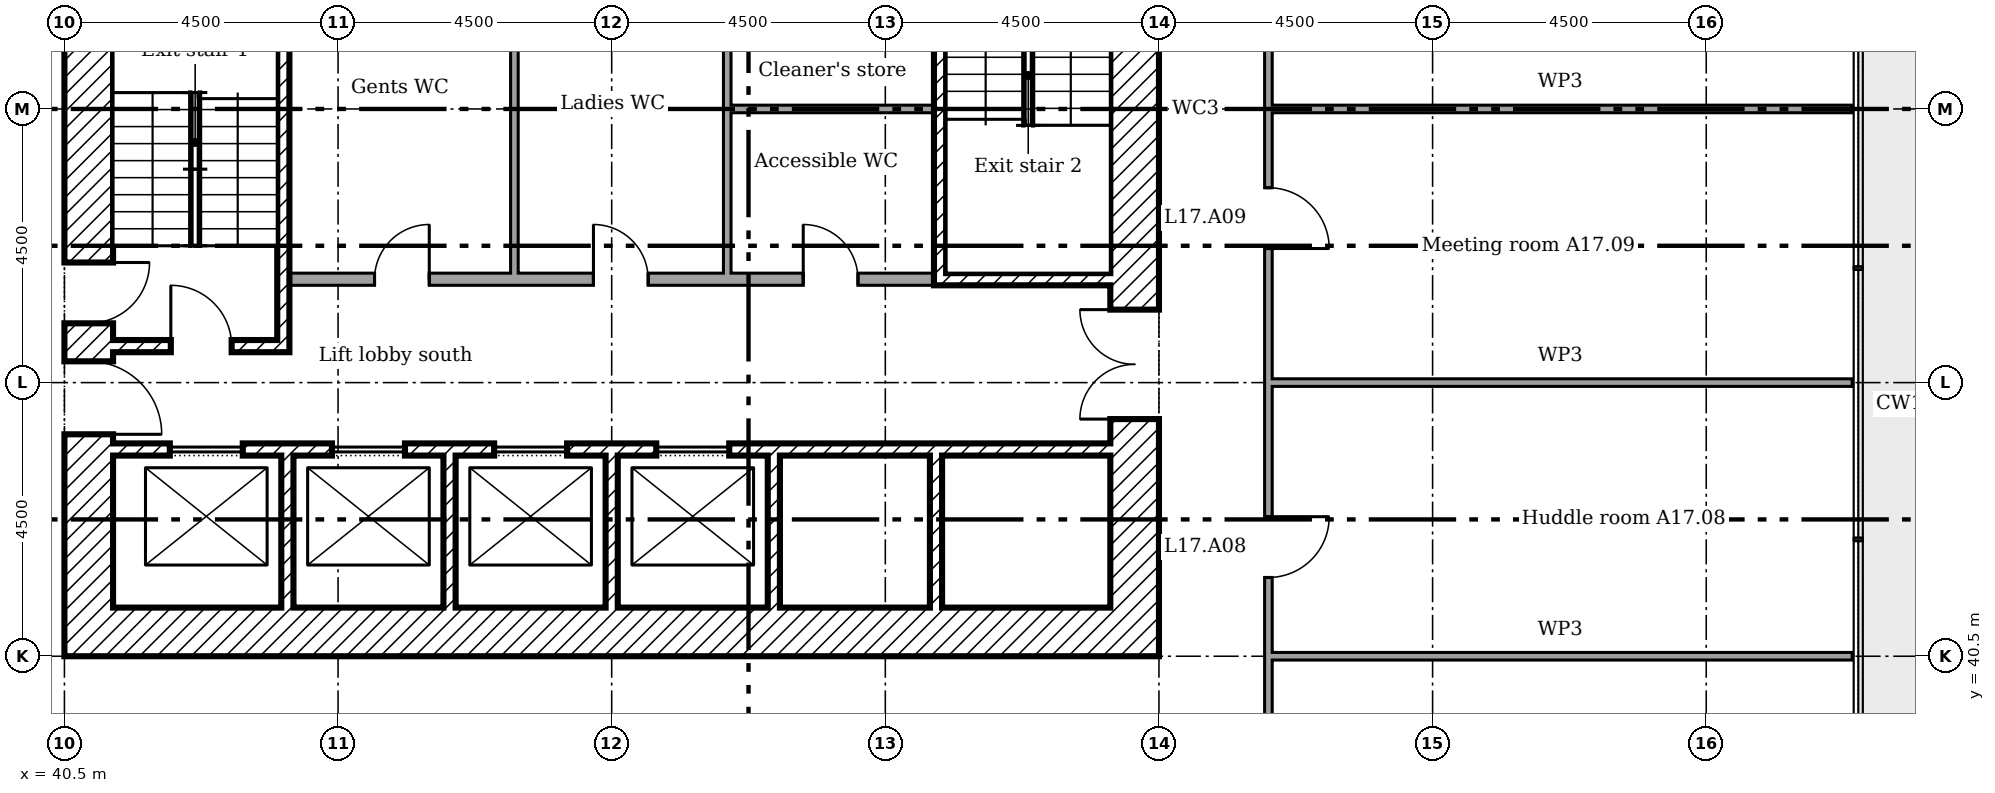
"""IFC4 building model, lengths in metres.
Left out: names, types, materials, properties, quantities, classifications, styles, units other than length and angle.
Written with IfcOpenShell. Run it as: python <this file> out.ifc"""

import sys

from ifc_helpers import new_model, si_unit, direction, frame, frame_2d, origin, place, context, subcontext, project, spatial, rectangle, extrude, element, fill, save


model = new_model("IFC4")
c1 = context("Model", 3, precision=1e-05, world=origin(), true_north=direction((0.0, 1.0)))
c2 = subcontext(c1, "Body", "Model", "MODEL_VIEW")
j1 = project(units=[si_unit("LENGTHUNIT", "METRE"), si_unit("PLANEANGLEUNIT", "RADIAN")], contexts=[c1])
p1 = place(None, origin())
s1 = spatial("IfcSite", under=j1, at=p1, CompositionType="ELEMENT")
p2 = place(p1, origin())
s2 = spatial("IfcBuilding", under=s1, at=p2, CompositionType="ELEMENT")
p3 = place(p2, frame((0.0, 0.0, 72.6)))
s3 = spatial("IfcBuildingStorey", under=s2, at=p3, CompositionType="ELEMENT", Elevation=72.6)
p4 = place(p3, frame((58.1, 40.5, 0.0), z_axis=(0.0, 0.0, 1.0), x_axis=(0.0, 1.0, 0.0)))
e1 = element("IfcWall", 1, at=p4, inside=s3, PredefinedType="SHEAR", context=c2, shape_type="SweptSolid", body=[
    extrude(rectangle(XDim=18.0, YDim=0.8, at=frame_2d((9.0, 0.0))), origin(), (0.0, 0.0, 1.0), 3.35),
])
p5 = place(p4, frame((13.15, 0.0, 0.0)))
e2 = element("IfcOpeningElement", 2, at=p5, cuts=e1, PredefinedType="OPENING", context=c2, shape_type="SweptSolid", body=[
    extrude(rectangle(XDim=1.2, YDim=2.1, at=frame_2d((0.6, 1.05))), frame((0.0, 0.41, 0.0), z_axis=(0.0, -1.0, 0.0), x_axis=(1.0, 0.0, 0.0)), (0.0, 0.0, 1.0), 0.82),
])
p6 = place(p4, frame((3.9, 0.0, 0.0)))
e3 = element("IfcOpeningElement", 3, at=p6, cuts=e1, PredefinedType="OPENING", context=c2, shape_type="SweptSolid", body=[
    extrude(rectangle(XDim=1.8, YDim=2.1, at=frame_2d((0.9, 1.05))), frame((0.0, 0.41, 0.0), z_axis=(0.0, -1.0, 0.0), x_axis=(1.0, 0.0, 0.0)), (0.0, 0.0, 1.0), 0.82),
])
p7 = place(p4, frame((11.525, 0.0, 0.0)))
e4 = element("IfcOpeningElement", 4, at=p7, cuts=e1, PredefinedType="OPENING", context=c2, shape_type="SweptSolid", body=[
    extrude(rectangle(XDim=1.0, YDim=2.1, at=frame_2d((0.5, 1.05))), frame((0.0, 0.41, 0.0), z_axis=(0.0, -1.0, 0.0), x_axis=(1.0, 0.0, 0.0)), (0.0, 0.0, 1.0), 0.82),
])
p8 = place(p3, frame((41.3, 40.9, 0.0)))
e5 = element("IfcWall", 5, at=p8, inside=s3, PredefinedType="SHEAR", context=c2, shape_type="SweptSolid", body=[
    extrude(rectangle(XDim=16.4, YDim=0.8, at=frame_2d((8.2, 0.0))), origin(), (0.0, 0.0, 1.0), 3.35),
])
p9 = place(p3, frame((40.9, 40.5, 0.0), z_axis=(0.0, 0.0, 1.0), x_axis=(0.0, 1.0, 0.0)))
e6 = element("IfcWall", 6, at=p9, inside=s3, PredefinedType="SHEAR", context=c2, shape_type="SweptSolid", body=[
    extrude(rectangle(XDim=18.0, YDim=0.8, at=frame_2d((9.0, 0.0))), origin(), (0.0, 0.0, 1.0), 3.35),
])
p10 = place(p9, frame((3.65, 0.0, 0.0)))
e7 = element("IfcOpeningElement", 7, at=p10, cuts=e6, PredefinedType="OPENING", context=c2, shape_type="SweptSolid", body=[
    extrude(rectangle(XDim=1.2, YDim=2.1, at=frame_2d((0.6, 1.05))), frame((0.0, 0.41, 0.0), z_axis=(0.0, -1.0, 0.0), x_axis=(1.0, 0.0, 0.0)), (0.0, 0.0, 1.0), 0.82),
])
p11 = place(p9, frame((5.475, 0.0, 0.0)))
e8 = element("IfcOpeningElement", 8, at=p11, cuts=e6, PredefinedType="OPENING", context=c2, shape_type="SweptSolid", body=[
    extrude(rectangle(XDim=1.0, YDim=2.1, at=frame_2d((0.5, 1.05))), frame((0.0, 0.41, 0.0), z_axis=(0.0, -1.0, 0.0), x_axis=(1.0, 0.0, 0.0)), (0.0, 0.0, 1.0), 0.82),
])
p12 = place(p9, frame((12.3, 0.0, 0.0)))
e9 = element("IfcOpeningElement", 9, at=p12, cuts=e6, PredefinedType="OPENING", context=c2, shape_type="SweptSolid", body=[
    extrude(rectangle(XDim=1.0, YDim=2.1, at=frame_2d((0.5, 1.05))), frame((0.0, 0.41, 0.0), z_axis=(0.0, -1.0, 0.0), x_axis=(1.0, 0.0, 0.0)), (0.0, 0.0, 1.0), 0.82),
])
for number, where, z_axis, x_axis in (
    (10, (44.167, 41.3, 0.0), (0.0, 0.0, 1.0), (0.0, 1.0, 0.0)),
    (11, (46.833, 41.3, 0.0), (0.0, 0.0, 1.0), (0.0, 1.0, 0.0)),
    (12, (49.5, 41.3, 0.0), (0.0, 0.0, 1.0), (0.0, 1.0, 0.0)),
    (13, (52.167, 41.3, 0.0), (0.0, 0.0, 1.0), (0.0, 1.0, 0.0)),
    (14, (54.833, 41.3, 0.0), (0.0, 0.0, 1.0), (0.0, 1.0, 0.0)),
):
    element("IfcWall", number, at=place(p3, frame(where, z_axis=z_axis, x_axis=x_axis)), inside=s3, PredefinedType="SHEAR", context=c2, shape_type="SweptSolid", body=[
        extrude(rectangle(XDim=2.5, YDim=0.2, at=frame_2d((1.25, 0.0))), origin(), (0.0, 0.0, 1.0), 3.35),
    ])
p13 = place(p3, frame((41.3, 43.9, 0.0)))
e15 = element("IfcWall", 15, at=p13, inside=s3, PredefinedType="SHEAR", context=c2, shape_type="SweptSolid", body=[
    extrude(rectangle(XDim=16.4, YDim=0.2, at=frame_2d((8.2, 0.0))), origin(), (0.0, 0.0, 1.0), 3.35),
])
p14 = place(p13, frame((0.933, 0.0, 0.0)))
e16 = element("IfcOpeningElement", 16, at=p14, cuts=e15, PredefinedType="OPENING", context=c2, shape_type="SweptSolid", body=[
    extrude(rectangle(XDim=1.2, YDim=2.1, at=frame_2d((0.6, 1.05))), frame((0.0, 0.11, 0.0), z_axis=(0.0, -1.0, 0.0), x_axis=(1.0, 0.0, 0.0)), (0.0, 0.0, 1.0), 0.22),
])
p15 = place(p13, frame((3.6, 0.0, 0.0)))
e17 = element("IfcOpeningElement", 17, at=p15, cuts=e15, PredefinedType="OPENING", context=c2, shape_type="SweptSolid", body=[
    extrude(rectangle(XDim=1.2, YDim=2.1, at=frame_2d((0.6, 1.05))), frame((0.0, 0.11, 0.0), z_axis=(0.0, -1.0, 0.0), x_axis=(1.0, 0.0, 0.0)), (0.0, 0.0, 1.0), 0.22),
])
p16 = place(p13, frame((6.267, 0.0, 0.0)))
e18 = element("IfcOpeningElement", 18, at=p16, cuts=e15, PredefinedType="OPENING", context=c2, shape_type="SweptSolid", body=[
    extrude(rectangle(XDim=1.2, YDim=2.1, at=frame_2d((0.6, 1.05))), frame((0.0, 0.11, 0.0), z_axis=(0.0, -1.0, 0.0), x_axis=(1.0, 0.0, 0.0)), (0.0, 0.0, 1.0), 0.22),
])
p17 = place(p13, frame((8.933, 0.0, 0.0)))
e19 = element("IfcOpeningElement", 19, at=p17, cuts=e15, PredefinedType="OPENING", context=c2, shape_type="SweptSolid", body=[
    extrude(rectangle(XDim=1.2, YDim=2.1, at=frame_2d((0.6, 1.05))), frame((0.0, 0.11, 0.0), z_axis=(0.0, -1.0, 0.0), x_axis=(1.0, 0.0, 0.0)), (0.0, 0.0, 1.0), 0.22),
])
p18 = place(p3, frame((44.1, 45.5, 0.0), z_axis=(0.0, 0.0, 1.0), x_axis=(0.0, 1.0, 0.0)))
e20 = element("IfcWall", 20, at=p18, inside=s3, PredefinedType="SHEAR", context=c2, shape_type="SweptSolid", body=[
    extrude(rectangle(XDim=6.9, YDim=0.2, at=frame_2d((3.45, 0.0))), origin(), (0.0, 0.0, 1.0), 3.35),
])
p19 = place(p3, frame((41.3, 45.6, 0.0)))
e21 = element("IfcWall", 21, at=p19, inside=s3, PredefinedType="SHEAR", context=c2, shape_type="SweptSolid", body=[
    extrude(rectangle(XDim=2.7, YDim=0.2, at=frame_2d((1.35, 0.0))), origin(), (0.0, 0.0, 1.0), 3.35),
])
p20 = place(p19, frame((0.95, 0.0, 0.0)))
e22 = element("IfcOpeningElement", 22, at=p20, cuts=e21, PredefinedType="OPENING", context=c2, shape_type="SweptSolid", body=[
    extrude(rectangle(XDim=1.0, YDim=2.1, at=frame_2d((0.5, 1.05))), frame((0.0, 0.11, 0.0), z_axis=(0.0, -1.0, 0.0), x_axis=(1.0, 0.0, 0.0)), (0.0, 0.0, 1.0), 0.22),
])
p21 = place(p3, frame((54.8, 46.7, 0.0)))
e23 = element("IfcWall", 23, at=p21, inside=s3, PredefinedType="SHEAR", context=c2, shape_type="SweptSolid", body=[
    extrude(rectangle(XDim=2.9, YDim=0.2, at=frame_2d((1.45, 0.0))), origin(), (0.0, 0.0, 1.0), 3.35),
])
p22 = place(p3, frame((54.9, 46.8, 0.0), z_axis=(0.0, 0.0, 1.0), x_axis=(0.0, 1.0, 0.0)))
e24 = element("IfcWall", 24, at=p22, inside=s3, PredefinedType="SHEAR", context=c2, shape_type="SweptSolid", body=[
    extrude(rectangle(XDim=6.5, YDim=0.2, at=frame_2d((3.25, 0.0))), origin(), (0.0, 0.0, 1.0), 3.35),
])
p23 = place(p3, frame((44.2, 46.7, 0.0)))
e25 = element("IfcWall", 25, at=p23, inside=s3, PredefinedType="PARTITIONING", context=c2, shape_type="SweptSolid", body=[
    extrude(rectangle(XDim=10.6, YDim=0.2, at=frame_2d((5.3, 0.0))), origin(), (0.0, 0.0, 1.0), 3.35),
])
p24 = place(p23, frame((1.4, 0.0, 0.0)))
e26 = element("IfcOpeningElement", 26, at=p24, cuts=e25, PredefinedType="OPENING", context=c2, shape_type="SweptSolid", body=[
    extrude(rectangle(XDim=0.9, YDim=2.1, at=frame_2d((0.45, 1.05))), frame((0.0, 0.11, 0.0), z_axis=(0.0, -1.0, 0.0), x_axis=(1.0, 0.0, 0.0)), (0.0, 0.0, 1.0), 0.22),
])
p25 = place(p23, frame((5.0, 0.0, 0.0)))
e27 = element("IfcOpeningElement", 27, at=p25, cuts=e25, PredefinedType="OPENING", context=c2, shape_type="SweptSolid", body=[
    extrude(rectangle(XDim=0.9, YDim=2.1, at=frame_2d((0.45, 1.05))), frame((0.0, 0.11, 0.0), z_axis=(0.0, -1.0, 0.0), x_axis=(1.0, 0.0, 0.0)), (0.0, 0.0, 1.0), 0.22),
])
p26 = place(p23, frame((8.45, 0.0, 0.0)))
e28 = element("IfcOpeningElement", 28, at=p26, cuts=e25, PredefinedType="OPENING", context=c2, shape_type="SweptSolid", body=[
    extrude(rectangle(XDim=0.9, YDim=2.1, at=frame_2d((0.45, 1.05))), frame((0.0, 0.11, 0.0), z_axis=(0.0, -1.0, 0.0), x_axis=(1.0, 0.0, 0.0)), (0.0, 0.0, 1.0), 0.22),
])
p27 = place(p3, frame((47.9, 46.8, 0.0), z_axis=(0.0, 0.0, 1.0), x_axis=(0.0, 1.0, 0.0)))
e29 = element("IfcWall", 29, at=p27, inside=s3, PredefinedType="PARTITIONING", context=c2, shape_type="SweptSolid", body=[
    extrude(rectangle(XDim=5.0, YDim=0.125, at=frame_2d((2.5, 0.0))), origin(), (0.0, 0.0, 1.0), 3.35),
])
p28 = place(p3, frame((51.4, 46.8, 0.0), z_axis=(0.0, 0.0, 1.0), x_axis=(0.0, 1.0, 0.0)))
e30 = element("IfcWall", 30, at=p28, inside=s3, PredefinedType="PARTITIONING", context=c2, shape_type="SweptSolid", body=[
    extrude(rectangle(XDim=2.762, YDim=0.125, at=frame_2d((1.381, 0.0))), origin(), (0.0, 0.0, 1.0), 3.35),
])
p29 = place(p3, frame((54.8, 49.5, 0.0), z_axis=(0.0, 0.0, 1.0), x_axis=(-1.0, 0.0, 0.0)))
e31 = element("IfcWall", 31, at=p29, inside=s3, PredefinedType="PARTITIONING", context=c2, shape_type="SweptSolid", body=[
    extrude(rectangle(XDim=3.338, YDim=0.125, at=frame_2d((1.669, 0.0))), origin(), (0.0, 0.0, 1.0), 3.35),
])
p30 = place(p3, frame((51.4, 49.5, 0.0), z_axis=(0.0, 0.0, 1.0), x_axis=(0.0, 1.0, 0.0)))
e32 = element("IfcWall", 32, at=p30, inside=s3, PredefinedType="PARTITIONING", context=c2, shape_type="SweptSolid", body=[
    extrude(rectangle(XDim=2.3, YDim=0.125, at=frame_2d((1.15, 0.0))), origin(), (0.0, 0.0, 1.0), 3.35),
])
for number, where in (
    (33, (60.3, 40.5, 0.0)),
    (34, (60.3, 45.0, 0.0)),
    (35, (60.3, 49.5, 0.0)),
):
    element("IfcWall", number, at=place(p3, frame(where)), inside=s3, PredefinedType="MOVABLE", context=c2, shape_type="SweptSolid", body=[
        extrude(rectangle(XDim=9.6, YDim=0.125, at=frame_2d((4.8, 0.0))), origin(), (0.0, 0.0, 1.0), 2.766),
    ])
p31 = place(p3, frame((60.3, 38.762, 0.0), z_axis=(0.0, 0.0, 1.0), x_axis=(0.0, 1.0, 0.0)))
e36 = element("IfcWall", 36, at=p31, inside=s3, PredefinedType="PARTITIONING", context=c2, shape_type="SweptSolid", body=[
    extrude(rectangle(XDim=21.475, YDim=0.125, at=frame_2d((10.738, 0.0))), origin(), (0.0, 0.0, 1.0), 3.45),
])
p32 = place(p31, frame((3.032, 0.0, 0.0)))
e37 = element("IfcOpeningElement", 37, at=p32, cuts=e36, PredefinedType="OPENING", context=c2, shape_type="SweptSolid", body=[
    extrude(rectangle(XDim=1.0, YDim=2.1, at=frame_2d((0.5, 1.05))), frame((0.0, 0.073, 0.0), z_axis=(0.0, -1.0, 0.0), x_axis=(1.0, 0.0, 0.0)), (0.0, 0.0, 1.0), 0.145),
])
p33 = place(p31, frame((8.442, 0.0, 0.0)))
e38 = element("IfcOpeningElement", 38, at=p33, cuts=e36, PredefinedType="OPENING", context=c2, shape_type="SweptSolid", body=[
    extrude(rectangle(XDim=1.0, YDim=2.1, at=frame_2d((0.5, 1.05))), frame((0.0, 0.073, 0.0), z_axis=(0.0, -1.0, 0.0), x_axis=(1.0, 0.0, 0.0)), (0.0, 0.0, 1.0), 0.145),
])
p34 = place(p31, frame((12.488, 0.0, 0.0)))
e39 = element("IfcOpeningElement", 39, at=p34, cuts=e36, PredefinedType="OPENING", context=c2, shape_type="SweptSolid", body=[
    extrude(rectangle(XDim=1.0, YDim=2.1, at=frame_2d((0.5, 1.05))), frame((0.0, 0.073, 0.0), z_axis=(0.0, -1.0, 0.0), x_axis=(1.0, 0.0, 0.0)), (0.0, 0.0, 1.0), 0.145),
])
p35 = place(p31, frame((16.532, 0.0, 0.0)))
e40 = element("IfcOpeningElement", 40, at=p35, cuts=e36, PredefinedType="OPENING", context=c2, shape_type="SweptSolid", body=[
    extrude(rectangle(XDim=1.0, YDim=2.1, at=frame_2d((0.5, 1.05))), frame((0.0, 0.073, 0.0), z_axis=(0.0, -1.0, 0.0), x_axis=(1.0, 0.0, 0.0)), (0.0, 0.0, 1.0), 0.145),
])
p36 = place(p31, frame((20.258, 0.0, 0.0)))
e41 = element("IfcOpeningElement", 41, at=p36, cuts=e36, PredefinedType="OPENING", context=c2, shape_type="SweptSolid", body=[
    extrude(rectangle(XDim=0.9, YDim=2.1, at=frame_2d((0.45, 1.05))), frame((0.0, 0.073, 0.0), z_axis=(0.0, -1.0, 0.0), x_axis=(1.0, 0.0, 0.0)), (0.0, 0.0, 1.0), 0.145),
])
p37 = place(p6, origin())
e42 = element("IfcDoor", 42, at=p37, inside=s3, OperationType="DOUBLE_DOOR_SINGLE_SWING", PredefinedType="DOOR", context=c2, shape_type="SweptSolid", body=[
    extrude(rectangle(XDim=1.8, YDim=2.1, at=frame_2d((0.9, 1.05))), frame((0.0, 0.025, 0.0), z_axis=(0.0, -1.0, 0.0), x_axis=(1.0, 0.0, 0.0)), (0.0, 0.0, 1.0), 0.05),
])
fill(e3, e42)
p38 = place(p10, frame((1.2, 0.0, 0.0), x_axis=(-1.0, 0.0, 0.0)))
e43 = element("IfcDoor", 43, at=p38, inside=s3, OperationType="SINGLE_SWING_LEFT", PredefinedType="DOOR", context=c2, shape_type="SweptSolid", body=[
    extrude(rectangle(XDim=1.2, YDim=2.1, at=frame_2d((0.6, 1.05))), frame((0.0, 0.025, 0.0), z_axis=(0.0, -1.0, 0.0), x_axis=(1.0, 0.0, 0.0)), (0.0, 0.0, 1.0), 0.05),
])
fill(e7, e43)
p39 = place(p20, origin())
e44 = element("IfcDoor", 44, at=p39, inside=s3, OperationType="SINGLE_SWING_RIGHT", PredefinedType="DOOR", context=c2, shape_type="SweptSolid", body=[
    extrude(rectangle(XDim=1.0, YDim=2.1, at=frame_2d((0.5, 1.05))), frame((0.0, 0.025, 0.0), z_axis=(0.0, -1.0, 0.0), x_axis=(1.0, 0.0, 0.0)), (0.0, 0.0, 1.0), 0.05),
])
fill(e22, e44)
p40 = place(p11, frame((1.0, 0.0, 0.0), x_axis=(-1.0, 0.0, 0.0)))
e45 = element("IfcDoor", 45, at=p40, inside=s3, OperationType="SINGLE_SWING_RIGHT", PredefinedType="DOOR", context=c2, shape_type="SweptSolid", body=[
    extrude(rectangle(XDim=1.0, YDim=2.1, at=frame_2d((0.5, 1.05))), frame((0.0, 0.025, 0.0), z_axis=(0.0, -1.0, 0.0), x_axis=(1.0, 0.0, 0.0)), (0.0, 0.0, 1.0), 0.05),
])
fill(e8, e45)
p41 = place(p24, origin())
e46 = element("IfcDoor", 46, at=p41, inside=s3, OperationType="SINGLE_SWING_LEFT", PredefinedType="DOOR", context=c2, shape_type="SweptSolid", body=[
    extrude(rectangle(XDim=0.9, YDim=2.1, at=frame_2d((0.45, 1.05))), frame((0.0, 0.025, 0.0), z_axis=(0.0, -1.0, 0.0), x_axis=(1.0, 0.0, 0.0)), (0.0, 0.0, 1.0), 0.05),
])
fill(e26, e46)
p42 = place(p25, origin())
e47 = element("IfcDoor", 47, at=p42, inside=s3, OperationType="SINGLE_SWING_RIGHT", PredefinedType="DOOR", context=c2, shape_type="SweptSolid", body=[
    extrude(rectangle(XDim=0.9, YDim=2.1, at=frame_2d((0.45, 1.05))), frame((0.0, 0.025, 0.0), z_axis=(0.0, -1.0, 0.0), x_axis=(1.0, 0.0, 0.0)), (0.0, 0.0, 1.0), 0.05),
])
fill(e27, e47)
p43 = place(p26, origin())
e48 = element("IfcDoor", 48, at=p43, inside=s3, OperationType="SINGLE_SWING_RIGHT", PredefinedType="DOOR", context=c2, shape_type="SweptSolid", body=[
    extrude(rectangle(XDim=0.9, YDim=2.1, at=frame_2d((0.45, 1.05))), frame((0.0, 0.025, 0.0), z_axis=(0.0, -1.0, 0.0), x_axis=(1.0, 0.0, 0.0)), (0.0, 0.0, 1.0), 0.05),
])
fill(e28, e48)
p44 = place(p14, origin())
e49 = element("IfcDoor", 49, at=p44, inside=s3, OperationType="SLIDING_TO_LEFT", PredefinedType="DOOR", context=c2, shape_type="SweptSolid", body=[
    extrude(rectangle(XDim=1.2, YDim=2.1, at=frame_2d((0.6, 1.05))), frame((0.0, 0.025, 0.0), z_axis=(0.0, -1.0, 0.0), x_axis=(1.0, 0.0, 0.0)), (0.0, 0.0, 1.0), 0.05),
])
fill(e16, e49)
p45 = place(p15, origin())
e50 = element("IfcDoor", 50, at=p45, inside=s3, OperationType="SLIDING_TO_LEFT", PredefinedType="DOOR", context=c2, shape_type="SweptSolid", body=[
    extrude(rectangle(XDim=1.2, YDim=2.1, at=frame_2d((0.6, 1.05))), frame((0.0, 0.025, 0.0), z_axis=(0.0, -1.0, 0.0), x_axis=(1.0, 0.0, 0.0)), (0.0, 0.0, 1.0), 0.05),
])
fill(e17, e50)
p46 = place(p16, origin())
e51 = element("IfcDoor", 51, at=p46, inside=s3, OperationType="SLIDING_TO_LEFT", PredefinedType="DOOR", context=c2, shape_type="SweptSolid", body=[
    extrude(rectangle(XDim=1.2, YDim=2.1, at=frame_2d((0.6, 1.05))), frame((0.0, 0.025, 0.0), z_axis=(0.0, -1.0, 0.0), x_axis=(1.0, 0.0, 0.0)), (0.0, 0.0, 1.0), 0.05),
])
fill(e18, e51)
p47 = place(p17, origin())
e52 = element("IfcDoor", 52, at=p47, inside=s3, OperationType="SLIDING_TO_LEFT", PredefinedType="DOOR", context=c2, shape_type="SweptSolid", body=[
    extrude(rectangle(XDim=1.2, YDim=2.1, at=frame_2d((0.6, 1.05))), frame((0.0, 0.025, 0.0), z_axis=(0.0, -1.0, 0.0), x_axis=(1.0, 0.0, 0.0)), (0.0, 0.0, 1.0), 0.05),
])
fill(e19, e52)
p48 = place(p32, frame((1.0, 0.0, 0.0), x_axis=(-1.0, 0.0, 0.0)))
e53 = element("IfcDoor", 53, at=p48, inside=s3, OperationType="SINGLE_SWING_RIGHT", PredefinedType="DOOR", context=c2, shape_type="SweptSolid", body=[
    extrude(rectangle(XDim=1.0, YDim=2.1, at=frame_2d((0.5, 1.05))), frame((0.0, 0.025, 0.0), z_axis=(0.0, -1.0, 0.0), x_axis=(1.0, 0.0, 0.0)), (0.0, 0.0, 1.0), 0.05),
])
fill(e37, e53)
p49 = place(p33, frame((1.0, 0.0, 0.0), x_axis=(-1.0, 0.0, 0.0)))
e54 = element("IfcDoor", 54, at=p49, inside=s3, OperationType="SINGLE_SWING_LEFT", PredefinedType="DOOR", context=c2, shape_type="SweptSolid", body=[
    extrude(rectangle(XDim=1.0, YDim=2.1, at=frame_2d((0.5, 1.05))), frame((0.0, 0.025, 0.0), z_axis=(0.0, -1.0, 0.0), x_axis=(1.0, 0.0, 0.0)), (0.0, 0.0, 1.0), 0.05),
])
fill(e38, e54)
save(model, sys.argv[1])
